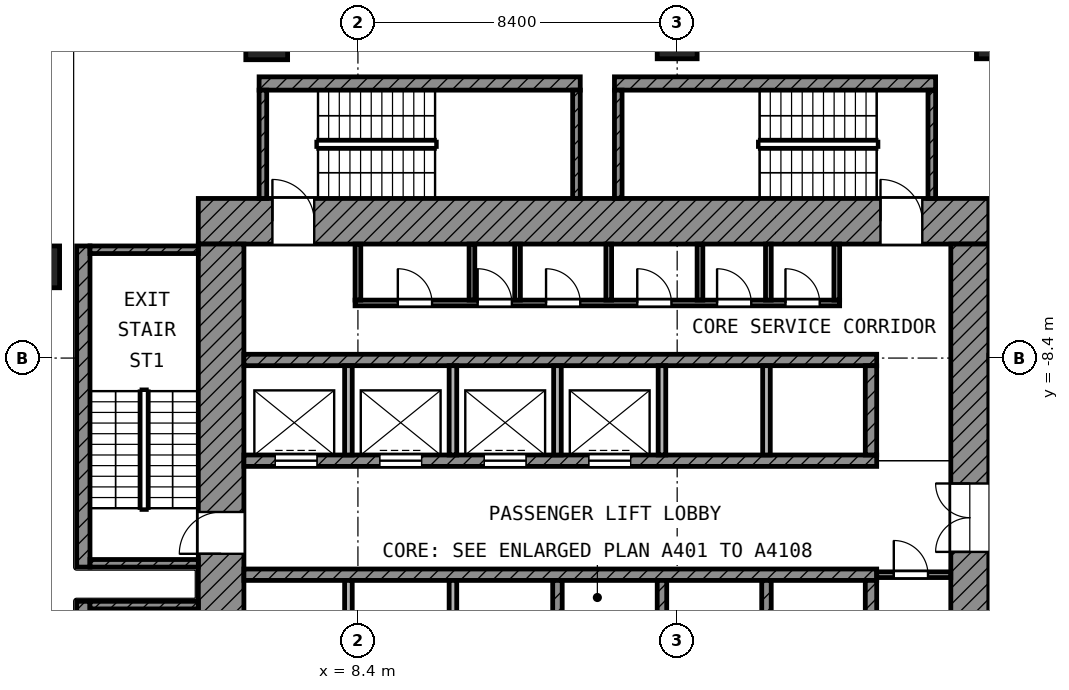
"""IFC4 building model, lengths in metres.
Left out: names, types, materials, properties, quantities, classifications, styles, units other than length and angle.
Written with IfcOpenShell. Run it as: python <this file> out.ifc"""

import sys

from ifc_helpers import new_model, si_unit, direction, frame, frame_2d, origin, origin_2d, place, context, subcontext, project, spatial, rectangle, extrude, element, fill, save


model = new_model("IFC4")
c1 = context("Model", 3, precision=1e-05, world=origin(), true_north=direction((0.0, 1.0)))
c2 = subcontext(c1, "Body", "Model", "MODEL_VIEW")
j1 = project(units=[si_unit("LENGTHUNIT", "METRE"), si_unit("PLANEANGLEUNIT", "RADIAN")], contexts=[c1])
p1 = place(None, origin())
s1 = spatial("IfcSite", under=j1, at=p1, CompositionType="ELEMENT")
p2 = place(p1, origin())
s2 = spatial("IfcBuilding", under=s1, at=p2, CompositionType="ELEMENT")
p3 = place(p2, frame((0.0, 0.0, 111.4)))
s3 = spatial("IfcBuildingStorey", under=s2, at=p3, CompositionType="ELEMENT", Elevation=111.4)
p4 = place(p3, frame((6.0, 0.0, 0.0), z_axis=(0.0, 0.0, 1.0), x_axis=(1.0, 0.0, 0.0)))
e1 = element("IfcColumn", 1, at=p4, inside=s3, PredefinedType="COLUMN", context=c2, shape_type="SweptSolid", body=[
    extrude(rectangle(XDim=1.1, YDim=1.1, at=origin_2d()), origin(), (0.0, 0.0, 1.0), 4.2),
])
for number, where, z_axis, x_axis in (
    (2, (16.8, 0.0, 0.0), (0.0, 0.0, 1.0), (1.0, 0.0, 0.0)),
    (3, (25.2, 0.0, 0.0), (0.0, 0.0, 1.0), (1.0, 0.0, 0.0)),
):
    element("IfcColumn", number, at=place(p3, frame(where, z_axis=z_axis, x_axis=x_axis)), inside=s3, PredefinedType="COLUMN", context=c2, shape_type="SweptSolid", body=[
        extrude(rectangle(XDim=1.05, YDim=1.05, at=origin_2d()), origin(), (0.0, 0.0, 1.0), 4.2),
    ])
p5 = place(p3, frame((0.0, -6.0, 0.0), z_axis=(0.0, 0.0, 1.0), x_axis=(1.0, 0.0, 0.0)))
e4 = element("IfcColumn", 4, at=p5, inside=s3, PredefinedType="COLUMN", context=c2, shape_type="SweptSolid", body=[
    extrude(rectangle(XDim=1.1, YDim=1.1, at=origin_2d()), origin(), (0.0, 0.0, 1.0), 4.2),
])
p6 = place(p3, frame((4.2, -4.8, 0.0), z_axis=(0.0, 0.0, 1.0), x_axis=(1.0, 0.0, 0.0)))
e5 = element("IfcWall", 5, at=p6, inside=s3, PredefinedType="SHEAR", context=c2, shape_type="SweptSolid", body=[
    extrude(rectangle(XDim=20.8, YDim=1.2, at=frame_2d((10.4, 0.0))), origin(), (0.0, 0.0, 1.0), 3.6),
])
p7 = place(p6, frame((1.95, 0.0, 0.0)))
e6 = element("IfcOpeningElement", 6, at=p7, cuts=e5, PredefinedType="OPENING", context=c2, shape_type="SweptSolid", body=[
    extrude(rectangle(XDim=1.1, YDim=2.1, at=frame_2d((0.55, 1.05))), frame((0.0, 0.61, 0.0), z_axis=(0.0, -1.0, 0.0), x_axis=(1.0, 0.0, 0.0)), (0.0, 0.0, 1.0), 1.22),
])
p8 = place(p6, frame((17.95, 0.0, 0.0)))
e7 = element("IfcOpeningElement", 7, at=p8, cuts=e5, PredefinedType="OPENING", context=c2, shape_type="SweptSolid", body=[
    extrude(rectangle(XDim=1.1, YDim=2.1, at=frame_2d((0.55, 1.05))), frame((0.0, 0.61, 0.0), z_axis=(0.0, -1.0, 0.0), x_axis=(1.0, 0.0, 0.0)), (0.0, 0.0, 1.0), 1.22),
])
p9 = place(p3, frame((4.8, -25.0, 0.0), z_axis=(0.0, 0.0, 1.0), x_axis=(0.0, 1.0, 0.0)))
e8 = element("IfcWall", 8, at=p9, inside=s3, PredefinedType="SHEAR", context=c2, shape_type="SweptSolid", body=[
    extrude(rectangle(XDim=19.6, YDim=1.2, at=frame_2d((9.8, 0.0))), origin(), (0.0, 0.0, 1.0), 3.6),
])
p10 = place(p9, frame((11.45, 0.0, 0.0)))
e9 = element("IfcOpeningElement", 9, at=p10, cuts=e8, PredefinedType="OPENING", context=c2, shape_type="SweptSolid", body=[
    extrude(rectangle(XDim=1.1, YDim=2.1, at=frame_2d((0.55, 1.05))), frame((0.0, 0.61, 0.0), z_axis=(0.0, -1.0, 0.0), x_axis=(1.0, 0.0, 0.0)), (0.0, 0.0, 1.0), 1.22),
])
p11 = place(p9, frame((2.15, 0.0, 0.0)))
e10 = element("IfcOpeningElement", 10, at=p11, cuts=e8, PredefinedType="OPENING", context=c2, shape_type="SweptSolid", body=[
    extrude(rectangle(XDim=1.1, YDim=2.1, at=frame_2d((0.55, 1.05))), frame((0.0, 0.61, 0.0), z_axis=(0.0, -1.0, 0.0), x_axis=(1.0, 0.0, 0.0)), (0.0, 0.0, 1.0), 1.22),
])
p12 = place(p3, frame((24.5, -24.0, 0.0), z_axis=(0.0, 0.0, 1.0), x_axis=(0.0, 1.0, 0.0)))
e11 = element("IfcWall", 11, at=p12, inside=s3, PredefinedType="SHEAR", context=c2, shape_type="SweptSolid", body=[
    extrude(rectangle(XDim=18.6, YDim=1.0, at=frame_2d((9.3, 0.0))), origin(), (0.0, 0.0, 1.0), 3.6),
])
p13 = place(p12, frame((10.5, 0.0, 0.0)))
e12 = element("IfcOpeningElement", 12, at=p13, cuts=e11, PredefinedType="OPENING", context=c2, shape_type="SweptSolid", body=[
    extrude(rectangle(XDim=1.8, YDim=2.1, at=frame_2d((0.9, 1.05))), frame((0.0, 0.51, 0.0), z_axis=(0.0, -1.0, 0.0), x_axis=(1.0, 0.0, 0.0)), (0.0, 0.0, 1.0), 1.02),
])
p14 = place(p3, frame((5.4, -8.45, 0.0), z_axis=(0.0, 0.0, 1.0), x_axis=(1.0, 0.0, 0.0)))
e13 = element("IfcWall", 13, at=p14, inside=s3, PredefinedType="SHEAR", context=c2, shape_type="SweptSolid", body=[
    extrude(rectangle(XDim=16.65, YDim=0.3, at=frame_2d((8.325, 0.0))), origin(), (0.0, 0.0, 1.0), 3.6),
])
p15 = place(p3, frame((5.4, -11.1, 0.0), z_axis=(0.0, 0.0, 1.0), x_axis=(1.0, 0.0, 0.0)))
e14 = element("IfcWall", 14, at=p15, inside=s3, PredefinedType="SHEAR", context=c2, shape_type="SweptSolid", body=[
    extrude(rectangle(XDim=16.65, YDim=0.3, at=frame_2d((8.325, 0.0))), origin(), (0.0, 0.0, 1.0), 3.6),
])
p16 = place(p15, frame((0.825, 0.0, 0.0)))
e15 = element("IfcOpeningElement", 15, at=p16, cuts=e14, PredefinedType="OPENING", context=c2, shape_type="SweptSolid", body=[
    extrude(rectangle(XDim=1.1, YDim=2.1, at=frame_2d((0.55, 1.05))), frame((0.0, 0.16, 0.0), z_axis=(0.0, -1.0, 0.0), x_axis=(1.0, 0.0, 0.0)), (0.0, 0.0, 1.0), 0.32),
])
p17 = place(p15, frame((3.575, 0.0, 0.0)))
e16 = element("IfcOpeningElement", 16, at=p17, cuts=e14, PredefinedType="OPENING", context=c2, shape_type="SweptSolid", body=[
    extrude(rectangle(XDim=1.1, YDim=2.1, at=frame_2d((0.55, 1.05))), frame((0.0, 0.16, 0.0), z_axis=(0.0, -1.0, 0.0), x_axis=(1.0, 0.0, 0.0)), (0.0, 0.0, 1.0), 0.32),
])
p18 = place(p15, frame((6.325, 0.0, 0.0)))
e17 = element("IfcOpeningElement", 17, at=p18, cuts=e14, PredefinedType="OPENING", context=c2, shape_type="SweptSolid", body=[
    extrude(rectangle(XDim=1.1, YDim=2.1, at=frame_2d((0.55, 1.05))), frame((0.0, 0.16, 0.0), z_axis=(0.0, -1.0, 0.0), x_axis=(1.0, 0.0, 0.0)), (0.0, 0.0, 1.0), 0.32),
])
p19 = place(p15, frame((9.075, 0.0, 0.0)))
e18 = element("IfcOpeningElement", 18, at=p19, cuts=e14, PredefinedType="OPENING", context=c2, shape_type="SweptSolid", body=[
    extrude(rectangle(XDim=1.1, YDim=2.1, at=frame_2d((0.55, 1.05))), frame((0.0, 0.16, 0.0), z_axis=(0.0, -1.0, 0.0), x_axis=(1.0, 0.0, 0.0)), (0.0, 0.0, 1.0), 0.32),
])
p20 = place(p3, frame((5.4, -14.1, 0.0), z_axis=(0.0, 0.0, 1.0), x_axis=(1.0, 0.0, 0.0)))
e19 = element("IfcWall", 19, at=p20, inside=s3, PredefinedType="SHEAR", context=c2, shape_type="SweptSolid", body=[
    extrude(rectangle(XDim=16.65, YDim=0.3, at=frame_2d((8.325, 0.0))), origin(), (0.0, 0.0, 1.0), 3.6),
])
p21 = place(p3, frame((21.9, -10.95, 0.0), z_axis=(0.0, 0.0, 1.0), x_axis=(0.0, 1.0, 0.0)))
e20 = element("IfcWall", 20, at=p21, inside=s3, PredefinedType="SHEAR", context=c2, shape_type="SweptSolid", body=[
    extrude(rectangle(XDim=2.35, YDim=0.3, at=frame_2d((1.175, 0.0))), origin(), (0.0, 0.0, 1.0), 3.6),
])
p22 = place(p3, frame((21.9, -16.6, 0.0), z_axis=(0.0, 0.0, 1.0), x_axis=(0.0, 1.0, 0.0)))
e21 = element("IfcWall", 21, at=p22, inside=s3, PredefinedType="SHEAR", context=c2, shape_type="SweptSolid", body=[
    extrude(rectangle(XDim=2.35, YDim=0.3, at=frame_2d((1.175, 0.0))), origin(), (0.0, 0.0, 1.0), 3.6),
])
for number, where, z_axis, x_axis in (
    (22, (8.15, -10.95, 0.0), (0.0, 0.0, 1.0), (0.0, 1.0, 0.0)),
    (23, (10.9, -10.95, 0.0), (0.0, 0.0, 1.0), (0.0, 1.0, 0.0)),
    (24, (13.65, -10.95, 0.0), (0.0, 0.0, 1.0), (0.0, 1.0, 0.0)),
    (25, (16.4, -10.95, 0.0), (0.0, 0.0, 1.0), (0.0, 1.0, 0.0)),
    (26, (19.15, -10.95, 0.0), (0.0, 0.0, 1.0), (0.0, 1.0, 0.0)),
):
    element("IfcWall", number, at=place(p3, frame(where, z_axis=z_axis, x_axis=x_axis)), inside=s3, PredefinedType="PARTITIONING", context=c2, shape_type="SweptSolid", body=[
        extrude(rectangle(XDim=2.35, YDim=0.2, at=frame_2d((1.175, 0.0))), origin(), (0.0, 0.0, 1.0), 3.6),
    ])
for number, where, z_axis, x_axis in (
    (27, (8.15, -16.6, 0.0), (0.0, 0.0, 1.0), (0.0, 1.0, 0.0)),
    (28, (10.9, -16.6, 0.0), (0.0, 0.0, 1.0), (0.0, 1.0, 0.0)),
):
    element("IfcWall", number, at=place(p3, frame(where, z_axis=z_axis, x_axis=x_axis)), inside=s3, PredefinedType="PARTITIONING", context=c2, shape_type="SweptSolid", body=[
        extrude(rectangle(XDim=2.35, YDim=0.2, at=frame_2d((1.175, 0.0))), origin(), (0.0, 0.0, 1.0), 3.6),
    ])
for number, where, z_axis, x_axis in (
    (29, (13.65, -16.6, 0.0), (0.0, 0.0, 1.0), (0.0, 1.0, 0.0)),
    (30, (16.4, -16.6, 0.0), (0.0, 0.0, 1.0), (0.0, 1.0, 0.0)),
    (31, (19.15, -16.6, 0.0), (0.0, 0.0, 1.0), (0.0, 1.0, 0.0)),
):
    element("IfcWall", number, at=place(p3, frame(where, z_axis=z_axis, x_axis=x_axis)), inside=s3, PredefinedType="SHEAR", context=c2, shape_type="SweptSolid", body=[
        extrude(rectangle(XDim=2.35, YDim=0.25, at=frame_2d((1.175, 0.0))), origin(), (0.0, 0.0, 1.0), 3.6),
    ])
p23 = place(p3, frame((22.05, -14.1, 0.0), z_axis=(0.0, 0.0, 1.0), x_axis=(1.0, 0.0, 0.0)))
e32 = element("IfcWall", 32, at=p23, inside=s3, PredefinedType="PARTITIONING", context=c2, shape_type="SweptSolid", body=[
    extrude(rectangle(XDim=1.95, YDim=0.15, at=frame_2d((0.975, 0.0))), origin(), (0.0, 0.0, 1.0), 3.6),
])
p24 = place(p23, frame((0.45, 0.0, 0.0)))
e33 = element("IfcOpeningElement", 33, at=p24, cuts=e32, PredefinedType="OPENING", context=c2, shape_type="SweptSolid", body=[
    extrude(rectangle(XDim=0.9, YDim=2.1, at=frame_2d((0.45, 1.05))), frame((0.0, 0.085, 0.0), z_axis=(0.0, -1.0, 0.0), x_axis=(1.0, 0.0, 0.0)), (0.0, 0.0, 1.0), 0.17),
])
p25 = place(p3, frame((8.325, -6.95, 0.0), z_axis=(0.0, 0.0, 1.0), x_axis=(1.0, 0.0, 0.0)))
e34 = element("IfcWall", 34, at=p25, inside=s3, PredefinedType="PARTITIONING", context=c2, shape_type="SweptSolid", body=[
    extrude(rectangle(XDim=12.75, YDim=0.15, at=frame_2d((6.375, 0.0))), origin(), (0.0, 0.0, 1.0), 3.6),
])
p26 = place(p25, frame((1.125, 0.0, 0.0)))
e35 = element("IfcOpeningElement", 35, at=p26, cuts=e34, PredefinedType="OPENING", context=c2, shape_type="SweptSolid", body=[
    extrude(rectangle(XDim=0.9, YDim=2.1, at=frame_2d((0.45, 1.05))), frame((0.0, 0.085, 0.0), z_axis=(0.0, -1.0, 0.0), x_axis=(1.0, 0.0, 0.0)), (0.0, 0.0, 1.0), 0.17),
])
p27 = place(p25, frame((3.225, 0.0, 0.0)))
e36 = element("IfcOpeningElement", 36, at=p27, cuts=e34, PredefinedType="OPENING", context=c2, shape_type="SweptSolid", body=[
    extrude(rectangle(XDim=0.9, YDim=2.1, at=frame_2d((0.45, 1.05))), frame((0.0, 0.085, 0.0), z_axis=(0.0, -1.0, 0.0), x_axis=(1.0, 0.0, 0.0)), (0.0, 0.0, 1.0), 0.17),
])
p28 = place(p25, frame((5.025, 0.0, 0.0)))
e37 = element("IfcOpeningElement", 37, at=p28, cuts=e34, PredefinedType="OPENING", context=c2, shape_type="SweptSolid", body=[
    extrude(rectangle(XDim=0.9, YDim=2.1, at=frame_2d((0.45, 1.05))), frame((0.0, 0.085, 0.0), z_axis=(0.0, -1.0, 0.0), x_axis=(1.0, 0.0, 0.0)), (0.0, 0.0, 1.0), 0.17),
])
p29 = place(p25, frame((7.425, 0.0, 0.0)))
e38 = element("IfcOpeningElement", 38, at=p29, cuts=e34, PredefinedType="OPENING", context=c2, shape_type="SweptSolid", body=[
    extrude(rectangle(XDim=0.9, YDim=2.1, at=frame_2d((0.45, 1.05))), frame((0.0, 0.085, 0.0), z_axis=(0.0, -1.0, 0.0), x_axis=(1.0, 0.0, 0.0)), (0.0, 0.0, 1.0), 0.17),
])
p30 = place(p25, frame((9.525, 0.0, 0.0)))
e39 = element("IfcOpeningElement", 39, at=p30, cuts=e34, PredefinedType="OPENING", context=c2, shape_type="SweptSolid", body=[
    extrude(rectangle(XDim=0.9, YDim=2.1, at=frame_2d((0.45, 1.05))), frame((0.0, 0.085, 0.0), z_axis=(0.0, -1.0, 0.0), x_axis=(1.0, 0.0, 0.0)), (0.0, 0.0, 1.0), 0.17),
])
p31 = place(p25, frame((11.325, 0.0, 0.0)))
e40 = element("IfcOpeningElement", 40, at=p31, cuts=e34, PredefinedType="OPENING", context=c2, shape_type="SweptSolid", body=[
    extrude(rectangle(XDim=0.9, YDim=2.1, at=frame_2d((0.45, 1.05))), frame((0.0, 0.085, 0.0), z_axis=(0.0, -1.0, 0.0), x_axis=(1.0, 0.0, 0.0)), (0.0, 0.0, 1.0), 0.17),
])
for number, where, z_axis, x_axis in (
    (41, (8.4, -6.875, 0.0), (0.0, 0.0, 1.0), (0.0, 1.0, 0.0)),
    (42, (11.4, -6.875, 0.0), (0.0, 0.0, 1.0), (0.0, 1.0, 0.0)),
    (43, (12.6, -6.875, 0.0), (0.0, 0.0, 1.0), (0.0, 1.0, 0.0)),
    (44, (15.0, -6.875, 0.0), (0.0, 0.0, 1.0), (0.0, 1.0, 0.0)),
    (45, (17.4, -6.875, 0.0), (0.0, 0.0, 1.0), (0.0, 1.0, 0.0)),
    (46, (19.2, -6.875, 0.0), (0.0, 0.0, 1.0), (0.0, 1.0, 0.0)),
    (47, (21.0, -6.875, 0.0), (0.0, 0.0, 1.0), (0.0, 1.0, 0.0)),
):
    element("IfcWall", number, at=place(p3, frame(where, z_axis=z_axis, x_axis=x_axis)), inside=s3, PredefinedType="PARTITIONING", context=c2, shape_type="SweptSolid", body=[
        extrude(rectangle(XDim=1.475, YDim=0.15, at=frame_2d((0.738, 0.0))), origin(), (0.0, 0.0, 1.0), 3.6),
    ])
p32 = place(p3, frame((1.175, -13.9, 0.0), z_axis=(0.0, 0.0, 1.0), x_axis=(0.0, 1.0, 0.0)))
e48 = element("IfcWall", 48, at=p32, inside=s3, PredefinedType="SHEAR", context=c2, shape_type="SweptSolid", body=[
    extrude(rectangle(XDim=8.45, YDim=0.35, at=frame_2d((4.225, 0.0))), origin(), (0.0, 0.0, 1.0), 3.6),
])
for number, where, z_axis, x_axis in (
    (49, (1.35, -5.55, 0.0), (0.0, 0.0, 1.0), (1.0, 0.0, 0.0)),
    (50, (1.35, -13.8, 0.0), (0.0, 0.0, 1.0), (1.0, 0.0, 0.0)),
):
    element("IfcWall", number, at=place(p3, frame(where, z_axis=z_axis, x_axis=x_axis)), inside=s3, PredefinedType="SHEAR", context=c2, shape_type="SweptSolid", body=[
        extrude(rectangle(XDim=2.85, YDim=0.2, at=frame_2d((1.425, 0.0))), origin(), (0.0, 0.0, 1.0), 3.6),
    ])
p33 = place(p3, frame((1.175, -23.25, 0.0), z_axis=(0.0, 0.0, 1.0), x_axis=(0.0, 1.0, 0.0)))
e51 = element("IfcWall", 51, at=p33, inside=s3, PredefinedType="SHEAR", context=c2, shape_type="SweptSolid", body=[
    extrude(rectangle(XDim=8.45, YDim=0.35, at=frame_2d((4.225, 0.0))), origin(), (0.0, 0.0, 1.0), 3.6),
])
p34 = place(p3, frame((1.35, -14.9, 0.0), z_axis=(0.0, 0.0, 1.0), x_axis=(1.0, 0.0, 0.0)))
e52 = element("IfcWall", 52, at=p34, inside=s3, PredefinedType="SHEAR", context=c2, shape_type="SweptSolid", body=[
    extrude(rectangle(XDim=2.85, YDim=0.2, at=frame_2d((1.425, 0.0))), origin(), (0.0, 0.0, 1.0), 3.6),
])
p35 = place(p3, frame((5.8, -1.175, 0.0), z_axis=(0.0, 0.0, 1.0), x_axis=(1.0, 0.0, 0.0)))
e53 = element("IfcWall", 53, at=p35, inside=s3, PredefinedType="SHEAR", context=c2, shape_type="SweptSolid", body=[
    extrude(rectangle(XDim=8.45, YDim=0.35, at=frame_2d((4.225, 0.0))), origin(), (0.0, 0.0, 1.0), 3.6),
])
for number, where, z_axis, x_axis in (
    (54, (5.9, -4.2, 0.0), (0.0, 0.0, 1.0), (0.0, 1.0, 0.0)),
    (55, (14.15, -4.2, 0.0), (0.0, 0.0, 1.0), (0.0, 1.0, 0.0)),
):
    element("IfcWall", number, at=place(p3, frame(where, z_axis=z_axis, x_axis=x_axis)), inside=s3, PredefinedType="SHEAR", context=c2, shape_type="SweptSolid", body=[
        extrude(rectangle(XDim=2.85, YDim=0.2, at=frame_2d((1.425, 0.0))), origin(), (0.0, 0.0, 1.0), 3.6),
    ])
p36 = place(p3, frame((15.15, -1.175, 0.0), z_axis=(0.0, 0.0, 1.0), x_axis=(1.0, 0.0, 0.0)))
e56 = element("IfcWall", 56, at=p36, inside=s3, PredefinedType="SHEAR", context=c2, shape_type="SweptSolid", body=[
    extrude(rectangle(XDim=8.45, YDim=0.35, at=frame_2d((4.225, 0.0))), origin(), (0.0, 0.0, 1.0), 3.6),
])
for number, where, z_axis, x_axis in (
    (57, (15.25, -4.2, 0.0), (0.0, 0.0, 1.0), (0.0, 1.0, 0.0)),
    (58, (23.5, -4.2, 0.0), (0.0, 0.0, 1.0), (0.0, 1.0, 0.0)),
):
    element("IfcWall", number, at=place(p3, frame(where, z_axis=z_axis, x_axis=x_axis)), inside=s3, PredefinedType="SHEAR", context=c2, shape_type="SweptSolid", body=[
        extrude(rectangle(XDim=2.85, YDim=0.2, at=frame_2d((1.425, 0.0))), origin(), (0.0, 0.0, 1.0), 3.6),
    ])
p37 = place(p16, origin())
e59 = element("IfcDoor", 59, at=p37, inside=s3, OperationType="DOUBLE_DOOR_SLIDING", PredefinedType="DOOR", context=c2, shape_type="SweptSolid", body=[
    extrude(rectangle(XDim=1.1, YDim=2.1, at=frame_2d((0.55, 1.05))), frame((0.0, 0.025, 0.0), z_axis=(0.0, -1.0, 0.0), x_axis=(1.0, 0.0, 0.0)), (0.0, 0.0, 1.0), 0.05),
])
fill(e15, e59)
p38 = place(p17, origin())
e60 = element("IfcDoor", 60, at=p38, inside=s3, OperationType="DOUBLE_DOOR_SLIDING", PredefinedType="DOOR", context=c2, shape_type="SweptSolid", body=[
    extrude(rectangle(XDim=1.1, YDim=2.1, at=frame_2d((0.55, 1.05))), frame((0.0, 0.025, 0.0), z_axis=(0.0, -1.0, 0.0), x_axis=(1.0, 0.0, 0.0)), (0.0, 0.0, 1.0), 0.05),
])
fill(e16, e60)
p39 = place(p18, origin())
e61 = element("IfcDoor", 61, at=p39, inside=s3, OperationType="DOUBLE_DOOR_SLIDING", PredefinedType="DOOR", context=c2, shape_type="SweptSolid", body=[
    extrude(rectangle(XDim=1.1, YDim=2.1, at=frame_2d((0.55, 1.05))), frame((0.0, 0.025, 0.0), z_axis=(0.0, -1.0, 0.0), x_axis=(1.0, 0.0, 0.0)), (0.0, 0.0, 1.0), 0.05),
])
fill(e17, e61)
p40 = place(p19, origin())
e62 = element("IfcDoor", 62, at=p40, inside=s3, OperationType="DOUBLE_DOOR_SLIDING", PredefinedType="DOOR", context=c2, shape_type="SweptSolid", body=[
    extrude(rectangle(XDim=1.1, YDim=2.1, at=frame_2d((0.55, 1.05))), frame((0.0, 0.025, 0.0), z_axis=(0.0, -1.0, 0.0), x_axis=(1.0, 0.0, 0.0)), (0.0, 0.0, 1.0), 0.05),
])
fill(e18, e62)
p41 = place(p10, origin())
e63 = element("IfcDoor", 63, at=p41, inside=s3, OperationType="SINGLE_SWING_LEFT", PredefinedType="DOOR", context=c2, shape_type="SweptSolid", body=[
    extrude(rectangle(XDim=1.1, YDim=2.1, at=frame_2d((0.55, 1.05))), frame((0.0, 0.025, 0.0), z_axis=(0.0, -1.0, 0.0), x_axis=(1.0, 0.0, 0.0)), (0.0, 0.0, 1.0), 0.05),
])
fill(e9, e63)
p42 = place(p7, origin())
e64 = element("IfcDoor", 64, at=p42, inside=s3, OperationType="SINGLE_SWING_LEFT", PredefinedType="DOOR", context=c2, shape_type="SweptSolid", body=[
    extrude(rectangle(XDim=1.1, YDim=2.1, at=frame_2d((0.55, 1.05))), frame((0.0, 0.025, 0.0), z_axis=(0.0, -1.0, 0.0), x_axis=(1.0, 0.0, 0.0)), (0.0, 0.0, 1.0), 0.05),
])
fill(e6, e64)
p43 = place(p8, origin())
e65 = element("IfcDoor", 65, at=p43, inside=s3, OperationType="SINGLE_SWING_LEFT", PredefinedType="DOOR", context=c2, shape_type="SweptSolid", body=[
    extrude(rectangle(XDim=1.1, YDim=2.1, at=frame_2d((0.55, 1.05))), frame((0.0, 0.025, 0.0), z_axis=(0.0, -1.0, 0.0), x_axis=(1.0, 0.0, 0.0)), (0.0, 0.0, 1.0), 0.05),
])
fill(e7, e65)
p44 = place(p13, origin())
e66 = element("IfcDoor", 66, at=p44, inside=s3, OperationType="DOUBLE_DOOR_SINGLE_SWING", PredefinedType="DOOR", context=c2, shape_type="SweptSolid", body=[
    extrude(rectangle(XDim=1.8, YDim=2.1, at=frame_2d((0.9, 1.05))), frame((0.0, 0.025, 0.0), z_axis=(0.0, -1.0, 0.0), x_axis=(1.0, 0.0, 0.0)), (0.0, 0.0, 1.0), 0.05),
])
fill(e12, e66)
p45 = place(p26, origin())
e67 = element("IfcDoor", 67, at=p45, inside=s3, OperationType="SINGLE_SWING_LEFT", PredefinedType="DOOR", context=c2, shape_type="SweptSolid", body=[
    extrude(rectangle(XDim=0.9, YDim=2.1, at=frame_2d((0.45, 1.05))), frame((0.0, 0.025, 0.0), z_axis=(0.0, -1.0, 0.0), x_axis=(1.0, 0.0, 0.0)), (0.0, 0.0, 1.0), 0.05),
])
fill(e35, e67)
p46 = place(p27, origin())
e68 = element("IfcDoor", 68, at=p46, inside=s3, OperationType="SINGLE_SWING_LEFT", PredefinedType="DOOR", context=c2, shape_type="SweptSolid", body=[
    extrude(rectangle(XDim=0.9, YDim=2.1, at=frame_2d((0.45, 1.05))), frame((0.0, 0.025, 0.0), z_axis=(0.0, -1.0, 0.0), x_axis=(1.0, 0.0, 0.0)), (0.0, 0.0, 1.0), 0.05),
])
fill(e36, e68)
p47 = place(p28, origin())
e69 = element("IfcDoor", 69, at=p47, inside=s3, OperationType="SINGLE_SWING_LEFT", PredefinedType="DOOR", context=c2, shape_type="SweptSolid", body=[
    extrude(rectangle(XDim=0.9, YDim=2.1, at=frame_2d((0.45, 1.05))), frame((0.0, 0.025, 0.0), z_axis=(0.0, -1.0, 0.0), x_axis=(1.0, 0.0, 0.0)), (0.0, 0.0, 1.0), 0.05),
])
fill(e37, e69)
p48 = place(p29, origin())
e70 = element("IfcDoor", 70, at=p48, inside=s3, OperationType="SINGLE_SWING_LEFT", PredefinedType="DOOR", context=c2, shape_type="SweptSolid", body=[
    extrude(rectangle(XDim=0.9, YDim=2.1, at=frame_2d((0.45, 1.05))), frame((0.0, 0.025, 0.0), z_axis=(0.0, -1.0, 0.0), x_axis=(1.0, 0.0, 0.0)), (0.0, 0.0, 1.0), 0.05),
])
fill(e38, e70)
p49 = place(p30, origin())
e71 = element("IfcDoor", 71, at=p49, inside=s3, OperationType="SINGLE_SWING_LEFT", PredefinedType="DOOR", context=c2, shape_type="SweptSolid", body=[
    extrude(rectangle(XDim=0.9, YDim=2.1, at=frame_2d((0.45, 1.05))), frame((0.0, 0.025, 0.0), z_axis=(0.0, -1.0, 0.0), x_axis=(1.0, 0.0, 0.0)), (0.0, 0.0, 1.0), 0.05),
])
fill(e39, e71)
p50 = place(p31, origin())
e72 = element("IfcDoor", 72, at=p50, inside=s3, OperationType="SINGLE_SWING_LEFT", PredefinedType="DOOR", context=c2, shape_type="SweptSolid", body=[
    extrude(rectangle(XDim=0.9, YDim=2.1, at=frame_2d((0.45, 1.05))), frame((0.0, 0.025, 0.0), z_axis=(0.0, -1.0, 0.0), x_axis=(1.0, 0.0, 0.0)), (0.0, 0.0, 1.0), 0.05),
])
fill(e40, e72)
p51 = place(p24, origin())
e73 = element("IfcDoor", 73, at=p51, inside=s3, OperationType="SINGLE_SWING_LEFT", PredefinedType="DOOR", context=c2, shape_type="SweptSolid", body=[
    extrude(rectangle(XDim=0.9, YDim=2.1, at=frame_2d((0.45, 1.05))), frame((0.0, 0.025, 0.0), z_axis=(0.0, -1.0, 0.0), x_axis=(1.0, 0.0, 0.0)), (0.0, 0.0, 1.0), 0.05),
])
fill(e33, e73)
save(model, sys.argv[1])
